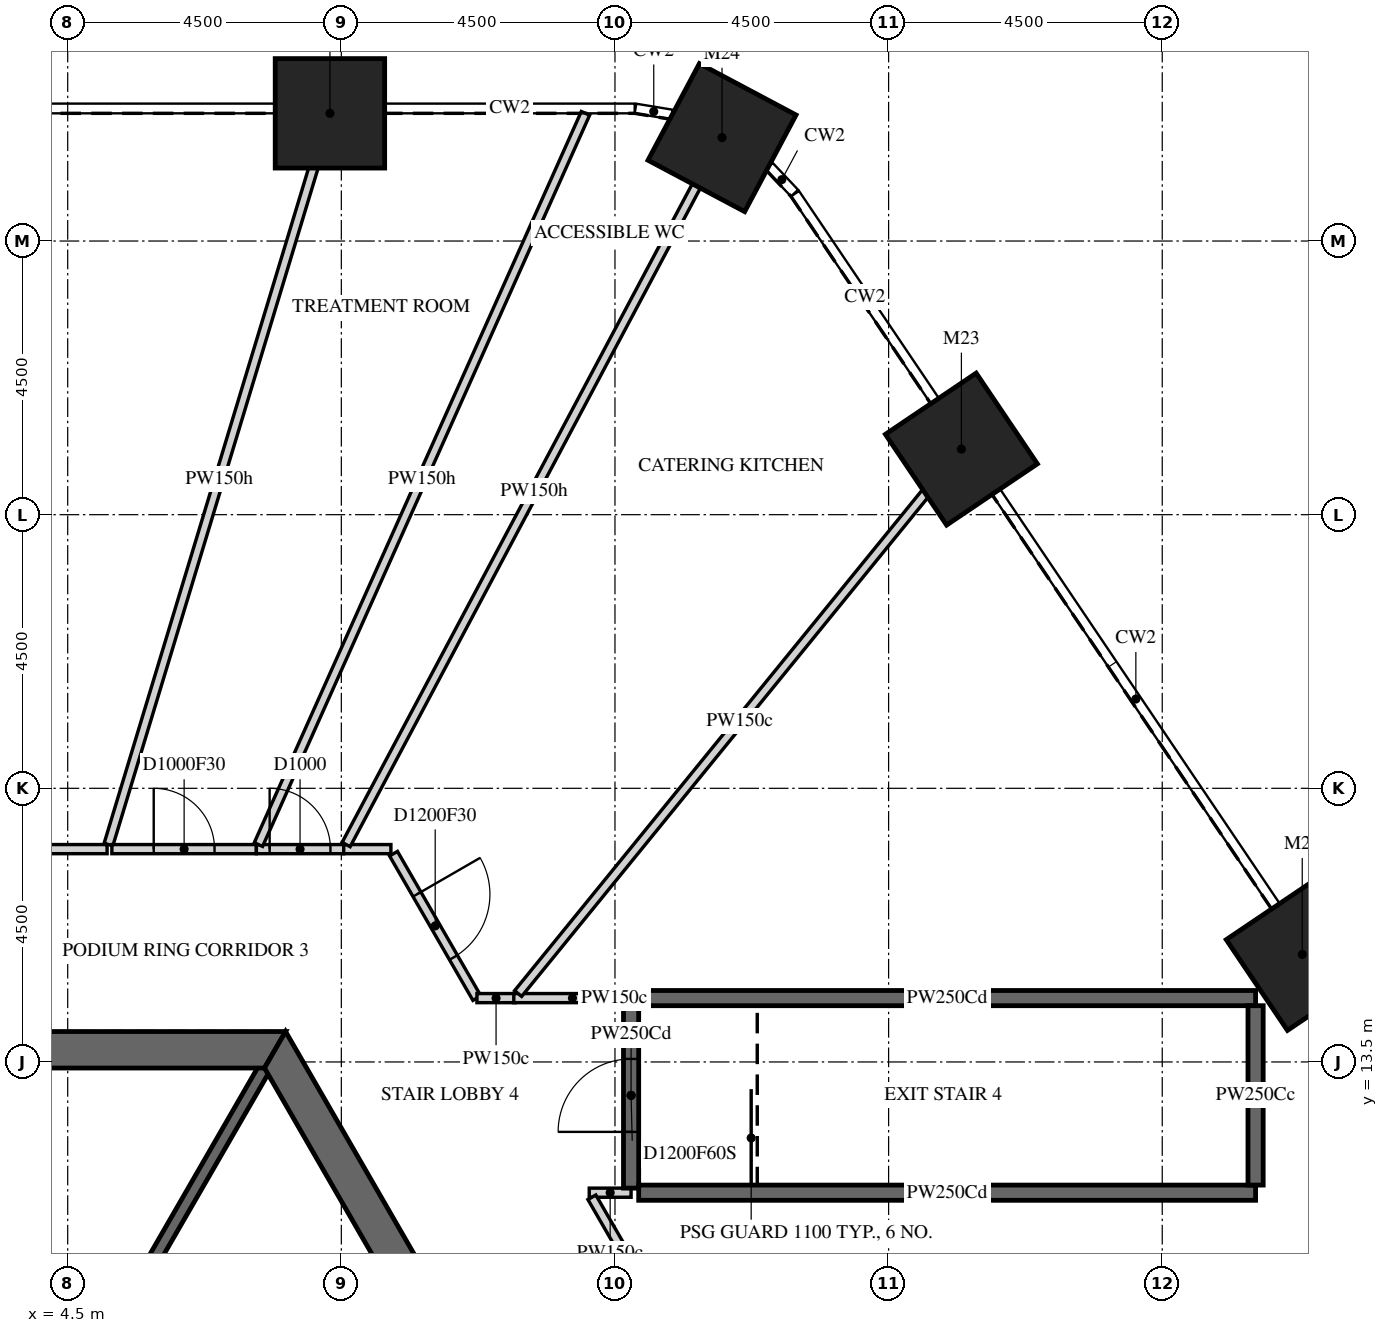
"""IFC4 building model, lengths in metres.
Left out: names, types, materials, properties, quantities, classifications, styles, units other than length and angle.
Written with IfcOpenShell. Run it as: python <this file> out.ifc"""

import sys

from ifc_helpers import new_model, si_unit, direction, frame, frame_2d, origin, origin_2d, place, context, subcontext, project, spatial, polyline, rectangle, outline, extrude, element, fill, save


model = new_model("IFC4")
c1 = context("Model", 3, precision=1e-05, world=origin(), true_north=direction((0.0, 1.0)))
c2 = subcontext(c1, "Body", "Model", "MODEL_VIEW")
j1 = project(units=[si_unit("LENGTHUNIT", "METRE"), si_unit("PLANEANGLEUNIT", "RADIAN")], contexts=[c1])
p1 = place(None, origin())
s1 = spatial("IfcSite", under=j1, at=p1, CompositionType="ELEMENT")
p2 = place(p1, origin())
s2 = spatial("IfcBuilding", under=s1, at=p2, CompositionType="ELEMENT")
p3 = place(p2, frame((0.0, 0.0, 26.0)))
s3 = spatial("IfcBuildingStorey", under=s2, at=p3, CompositionType="ELEMENT", Elevation=26.0)
for number, where, z_axis, x_axis in (
    (1, (8.812, 29.1, -0.25), (0.0, 0.0, 1.0), (1.0, 0.0, 0.0)),
    (2, (24.802, 15.269, -0.25), (0.0, 0.0, 1.0), (0.559, -0.829, 0.0)),
    (3, (19.197, 23.579, -0.25), (0.0, 0.0, 1.0), (0.559, -0.829, 0.0)),
    (4, (15.26, 28.701, -0.25), (0.0, 0.0, 1.0), (0.883, -0.469, 0.0)),
):
    element("IfcColumn", number, at=place(p3, frame(where, z_axis=z_axis, x_axis=x_axis)), inside=s3, PredefinedType="COLUMN", context=c2, shape_type="SweptSolid", body=[
        extrude(rectangle(XDim=1.8, YDim=1.8, at=origin_2d()), origin(), (0.0, 0.0, 1.0), 5.45),
    ])
p4 = place(p3, frame((15.819, 0.0, -0.25), z_axis=(0.0, 0.0, 1.0), x_axis=(-0.499999880136, 0.866025472988, 0.0)))
e5 = element("IfcWall", 5, at=p4, inside=s3, PredefinedType="SHEAR", context=c2, shape_type="SweptSolid", body=[
    extrude(outline(polyline([(-0.173, -0.3), (15.993, -0.3), (15.646, 0.3), (0.173, 0.3), (-0.173, -0.3)])), origin(), (0.0, 0.0, 1.0), 5.45),
])
p5 = place(p4, frame((6.981, 0.0, 0.25)))
e6 = element("IfcOpeningElement", 6, at=p5, cuts=e5, PredefinedType="OPENING", context=c2, shape_type="SweptSolid", body=[
    extrude(rectangle(XDim=1.8, YDim=2.4, at=frame_2d((0.9, 1.2))), frame((0.0, 0.31, 0.0), z_axis=(0.0, -1.0, 0.0), x_axis=(1.0, 0.0, 0.0)), (0.0, 0.0, 1.0), 0.62),
])
p6 = place(p3, frame((7.91, 13.7, -0.25), z_axis=(0.0, 0.0, 1.0), x_axis=(-1.0, 0.0, 0.0)))
e7 = element("IfcWall", 7, at=p6, inside=s3, PredefinedType="SHEAR", context=c2, shape_type="SweptSolid", body=[
    extrude(outline(polyline([(-0.173, -0.3), (15.993, -0.3), (15.646, 0.3), (0.173, 0.3), (-0.173, -0.3)])), origin(), (0.0, 0.0, 1.0), 5.45),
])
p7 = place(p6, frame((7.31, 0.0, 0.25)))
e8 = element("IfcOpeningElement", 8, at=p7, cuts=e7, PredefinedType="OPENING", context=c2, shape_type="SweptSolid", body=[
    extrude(rectangle(XDim=1.2, YDim=2.4, at=frame_2d((0.6, 1.2))), frame((0.0, 0.31, 0.0), z_axis=(0.0, -1.0, 0.0), x_axis=(1.0, 0.0, 0.0)), (0.0, 0.0, 1.0), 0.62),
])
p8 = place(p3, frame((5.773, 10.0, -0.25), z_axis=(0.0, 0.0, 1.0), x_axis=(0.500038251005, 0.86600331843, 0.0)))
e9 = element("IfcWall", 9, at=p8, inside=s3, PredefinedType="SHEAR", context=c2, shape_type="SweptSolid", body=[
    extrude(rectangle(XDim=3.926, YDim=0.2, at=frame_2d((1.963, 0.0))), origin(), (0.0, 0.0, 1.0), 5.45),
])
p9 = place(p3, frame((-6.563, 17.0, 0.0), z_axis=(0.0, 0.0, 1.0), x_axis=(1.0, 0.0, 0.0)))
e10 = element("IfcWall", 10, at=p9, inside=s3, PredefinedType="PARTITIONING", context=c2, shape_type="SweptSolid", body=[
    extrude(rectangle(XDim=11.711, YDim=0.15, at=frame_2d((5.855, 0.0))), origin(), (0.0, 0.0, 1.0), 5.2),
])
p10 = place(p9, frame((4.956, 0.0, 0.0)))
e11 = element("IfcOpeningElement", 11, at=p10, cuts=e10, PredefinedType="OPENING", context=c2, shape_type="SweptSolid", body=[
    extrude(rectangle(XDim=1.8, YDim=2.1, at=frame_2d((0.9, 1.05))), frame((0.0, 0.085, 0.0), z_axis=(0.0, -1.0, 0.0), x_axis=(1.0, 0.0, 0.0)), (0.0, 0.0, 1.0), 0.17),
])
p11 = place(p3, frame((5.171, 17.075, 0.0), z_axis=(0.0, 0.0, 1.0), x_axis=(0.289887131616, 0.957060839719, 0.0)))
e12 = element("IfcWall", 12, at=p11, inside=s3, PredefinedType="PARTITIONING", context=c2, shape_type="SweptSolid", body=[
    extrude(rectangle(XDim=12.565, YDim=0.15, at=frame_2d((6.282, 0.0))), origin(), (0.0, 0.0, 1.0), 4.273),
])
p12 = place(p3, frame((5.226, 17.0, 0.0), z_axis=(0.0, 0.0, 1.0), x_axis=(1.0, 0.0, 0.0)))
e13 = element("IfcWall", 13, at=p12, inside=s3, PredefinedType="PARTITIONING", context=c2, shape_type="SweptSolid", body=[
    extrude(rectangle(XDim=2.377, YDim=0.15, at=frame_2d((1.188, 0.0))), origin(), (0.0, 0.0, 1.0), 5.2),
])
p13 = place(p12, frame((0.688, 0.0, 0.0)))
e14 = element("IfcOpeningElement", 14, at=p13, cuts=e13, PredefinedType="OPENING", context=c2, shape_type="SweptSolid", body=[
    extrude(rectangle(XDim=1.0, YDim=2.1, at=frame_2d((0.5, 1.05))), frame((0.0, 0.085, 0.0), z_axis=(0.0, -1.0, 0.0), x_axis=(1.0, 0.0, 0.0)), (0.0, 0.0, 1.0), 0.17),
])
p14 = place(p3, frame((7.603, 17.0, 0.0), z_axis=(0.0, 0.0, 1.0), x_axis=(1.0, 0.0, 0.0)))
e15 = element("IfcWall", 15, at=p14, inside=s3, PredefinedType="PARTITIONING", context=c2, shape_type="SweptSolid", body=[
    extrude(rectangle(XDim=1.436, YDim=0.15, at=frame_2d((0.718, 0.0))), origin(), (0.0, 0.0, 1.0), 5.2),
])
p15 = place(p14, frame((0.218, 0.0, 0.0)))
e16 = element("IfcOpeningElement", 16, at=p15, cuts=e15, PredefinedType="OPENING", context=c2, shape_type="SweptSolid", body=[
    extrude(rectangle(XDim=1.0, YDim=2.1, at=frame_2d((0.5, 1.05))), frame((0.0, 0.085, 0.0), z_axis=(0.0, -1.0, 0.0), x_axis=(1.0, 0.0, 0.0)), (0.0, 0.0, 1.0), 0.17),
])
p16 = place(p3, frame((9.815, 17.0, 0.0), z_axis=(0.0, 0.0, 1.0), x_axis=(-1.0, 0.0, 0.0)))
e17 = element("IfcWall", 17, at=p16, inside=s3, PredefinedType="PARTITIONING", context=c2, shape_type="SweptSolid", body=[
    extrude(rectangle(XDim=0.776, YDim=0.15, at=frame_2d((0.388, 0.0))), origin(), (0.0, 0.0, 1.0), 5.2),
])
p17 = place(p3, frame((9.858, 16.925, 0.0), z_axis=(0.0, 0.0, 1.0), x_axis=(0.499835495421, -0.866120359718, 0.0)))
e18 = element("IfcWall", 18, at=p17, inside=s3, PredefinedType="PARTITIONING", context=c2, shape_type="SweptSolid", body=[
    extrude(rectangle(XDim=2.742, YDim=0.15, at=frame_2d((1.371, 0.0))), origin(), (0.0, 0.0, 1.0), 5.2),
])
p18 = place(p17, frame((0.771, 0.0, 0.0)))
e19 = element("IfcOpeningElement", 19, at=p18, cuts=e18, PredefinedType="OPENING", context=c2, shape_type="SweptSolid", body=[
    extrude(rectangle(XDim=1.2, YDim=2.1, at=frame_2d((0.6, 1.05))), frame((0.0, 0.085, 0.0), z_axis=(0.0, -1.0, 0.0), x_axis=(1.0, 0.0, 0.0)), (0.0, 0.0, 1.0), 0.17),
])
p19 = place(p3, frame((11.23, 14.55, 0.0), z_axis=(0.0, 0.0, 1.0), x_axis=(1.0, 0.0, 0.0)))
e20 = element("IfcWall", 20, at=p19, inside=s3, PredefinedType="PARTITIONING", context=c2, shape_type="SweptSolid", body=[
    extrude(rectangle(XDim=0.629, YDim=0.15, at=frame_2d((0.314, 0.0))), origin(), (0.0, 0.0, 1.0), 5.2),
])
p20 = place(p3, frame((11.836, 14.55, 0.0), z_axis=(0.0, 0.0, 1.0), x_axis=(1.0, 0.0, 0.0)))
e21 = element("IfcWall", 21, at=p20, inside=s3, PredefinedType="PARTITIONING", context=c2, shape_type="SweptSolid", body=[
    extrude(rectangle(XDim=1.929, YDim=0.15, at=frame_2d((0.964, 0.0))), origin(), (0.0, 0.0, 1.0), 5.2),
])
p21 = place(p3, frame((13.015, 29.1, 0.0), z_axis=(0.0, 0.0, 1.0), x_axis=(-0.408286813769, -0.912853700054, 0.0)))
e22 = element("IfcWall", 22, at=p21, inside=s3, PredefinedType="PARTITIONING", context=c2, shape_type="SweptSolid", body=[
    extrude(rectangle(XDim=13.173, YDim=0.15, at=frame_2d((6.586, 0.0))), origin(), (0.0, 0.0, 1.0), 4.273),
])
p22 = place(p3, frame((13.765, 11.35, 0.0), z_axis=(0.0, 0.0, 1.0), x_axis=(-1.0, 0.0, 0.0)))
e23 = element("IfcWall", 23, at=p22, inside=s3, PredefinedType="PARTITIONING", context=c2, shape_type="SweptSolid", body=[
    extrude(rectangle(XDim=0.688, YDim=0.15, at=frame_2d((0.344, 0.0))), origin(), (0.0, 0.0, 1.0), 5.2),
])
p23 = place(p3, frame((13.765, 11.425, 0.0), z_axis=(0.0, 0.0, 1.0), x_axis=(0.0, 1.0, 0.0)))
e24 = element("IfcWall", 24, at=p23, inside=s3, PredefinedType="PARTITIONING", context=c2, shape_type="SweptSolid", body=[
    extrude(rectangle(XDim=3.05, YDim=0.25, at=frame_2d((1.525, 0.0))), origin(), (0.0, 0.0, 1.0), 4.273),
])
p24 = place(p23, frame((0.925, 0.0, 0.0)))
e25 = element("IfcOpeningElement", 25, at=p24, cuts=e24, PredefinedType="OPENING", context=c2, shape_type="SweptSolid", body=[
    extrude(rectangle(XDim=1.2, YDim=2.1, at=frame_2d((0.6, 1.05))), frame((0.0, 0.135, 0.0), z_axis=(0.0, -1.0, 0.0), x_axis=(1.0, 0.0, 0.0)), (0.0, 0.0, 1.0), 0.27),
])
p25 = place(p3, frame((13.89, 14.55, 0.0), z_axis=(0.0, 0.0, 1.0), x_axis=(1.0, 0.0, 0.0)))
e26 = element("IfcWall", 26, at=p25, inside=s3, PredefinedType="PARTITIONING", context=c2, shape_type="SweptSolid", body=[
    extrude(rectangle(XDim=10.145, YDim=0.25, at=frame_2d((5.073, 0.0))), origin(), (0.0, 0.0, 1.0), 4.273),
])
p26 = place(p3, frame((14.723, 8.5, 0.0), z_axis=(0.0, 0.0, 1.0), x_axis=(-0.500104956678, 0.865964798538, 0.0)))
e27 = element("IfcWall", 27, at=p26, inside=s3, PredefinedType="PARTITIONING", context=c2, shape_type="SweptSolid", body=[
    extrude(rectangle(XDim=3.204, YDim=0.15, at=frame_2d((1.602, 0.0))), origin(), (0.0, 0.0, 1.0), 5.2),
])
p27 = place(p3, frame((15.261, 28.701, 0.0), z_axis=(0.0, 0.0, 1.0), x_axis=(-0.469500426527, -0.882932245131, 0.0)))
e28 = element("IfcWall", 28, at=p27, inside=s3, PredefinedType="PARTITIONING", context=c2, shape_type="SweptSolid", body=[
    extrude(rectangle(XDim=13.167, YDim=0.15, at=frame_2d((6.584, 0.0))), origin(), (0.0, 0.0, 1.0), 4.273),
])
p28 = place(p3, frame((19.197, 23.578, 0.0), z_axis=(0.0, 0.0, 1.0), x_axis=(-0.631417805909, -0.775442811805, 0.0)))
e29 = element("IfcWall", 29, at=p28, inside=s3, PredefinedType="PARTITIONING", context=c2, shape_type="SweptSolid", body=[
    extrude(rectangle(XDim=11.545, YDim=0.15, at=frame_2d((5.773, 0.0))), origin(), (0.0, 0.0, 1.0), 5.2),
])
p29 = place(p3, frame((24.035, 11.35, 0.0), z_axis=(0.0, 0.0, 1.0), x_axis=(-1.0, 0.0, 0.0)))
e30 = element("IfcWall", 30, at=p29, inside=s3, PredefinedType="PARTITIONING", context=c2, shape_type="SweptSolid", body=[
    extrude(rectangle(XDim=10.145, YDim=0.25, at=frame_2d((5.073, 0.0))), origin(), (0.0, 0.0, 1.0), 4.273),
])
p30 = place(p3, frame((24.035, 14.425, 0.0), z_axis=(0.0, 0.0, 1.0), x_axis=(0.0, -1.0, 0.0)))
e31 = element("IfcWall", 31, at=p30, inside=s3, PredefinedType="PARTITIONING", context=c2, shape_type="SweptSolid", body=[
    extrude(rectangle(XDim=2.95, YDim=0.25, at=frame_2d((1.475, 0.0))), origin(), (0.0, 0.0, 1.0), 5.2),
])
p31 = place(p13, origin())
e32 = element("IfcDoor", 32, at=p31, inside=s3, OperationType="SINGLE_SWING_LEFT", PredefinedType="DOOR", context=c2, shape_type="SweptSolid", body=[
    extrude(rectangle(XDim=1.0, YDim=2.1, at=frame_2d((0.5, 1.05))), frame((0.0, 0.025, 0.0), z_axis=(0.0, -1.0, 0.0), x_axis=(1.0, 0.0, 0.0)), (0.0, 0.0, 1.0), 0.05),
])
fill(e14, e32)
p32 = place(p15, origin())
e33 = element("IfcDoor", 33, at=p32, inside=s3, OperationType="SINGLE_SWING_RIGHT", PredefinedType="DOOR", context=c2, shape_type="SweptSolid", body=[
    extrude(rectangle(XDim=1.0, YDim=2.1, at=frame_2d((0.5, 1.05))), frame((0.0, 0.025, 0.0), z_axis=(0.0, -1.0, 0.0), x_axis=(1.0, 0.0, 0.0)), (0.0, 0.0, 1.0), 0.05),
])
fill(e16, e33)
p33 = place(p18, origin())
e34 = element("IfcDoor", 34, at=p33, inside=s3, OperationType="SINGLE_SWING_RIGHT", PredefinedType="DOOR", context=c2, shape_type="SweptSolid", body=[
    extrude(rectangle(XDim=1.2, YDim=2.1, at=frame_2d((0.6, 1.05))), frame((0.0, 0.025, 0.0), z_axis=(0.0, -1.0, 0.0), x_axis=(1.0, 0.0, 0.0)), (0.0, 0.0, 1.0), 0.05),
])
fill(e19, e34)
p34 = place(p24, origin())
e35 = element("IfcDoor", 35, at=p34, inside=s3, OperationType="SINGLE_SWING_RIGHT", PredefinedType="DOOR", context=c2, shape_type="SweptSolid", body=[
    extrude(rectangle(XDim=1.2, YDim=2.1, at=frame_2d((0.6, 1.05))), frame((0.0, 0.025, 0.0), z_axis=(0.0, -1.0, 0.0), x_axis=(1.0, 0.0, 0.0)), (0.0, 0.0, 1.0), 0.05),
])
fill(e25, e35)
save(model, sys.argv[1])
